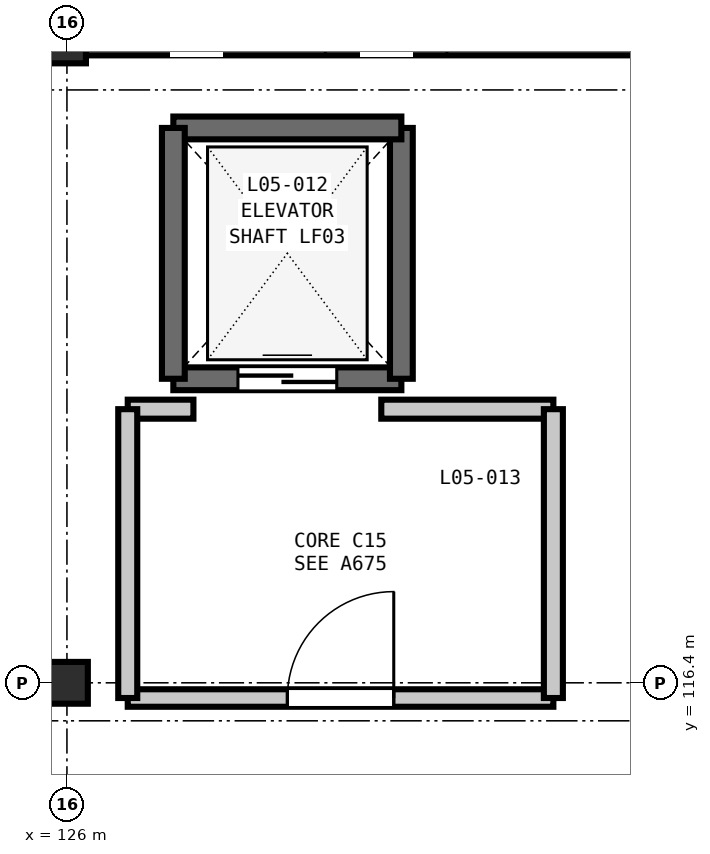
"""IFC4 building model, lengths in metres.
Left out: names, types, materials, properties, quantities, classifications, styles, units other than length and angle.
Written with IfcOpenShell. Run it as: python <this file> out.ifc"""

import sys

from ifc_helpers import new_model, si_unit, direction, frame, frame_2d, origin, origin_2d, place, context, subcontext, project, spatial, rectangle, extrude, element, fill, save


model = new_model("IFC4")
c1 = context("Model", 3, precision=1e-05, world=origin(), true_north=direction((0.0, 1.0)))
c2 = subcontext(c1, "Body", "Model", "MODEL_VIEW")
j1 = project(units=[si_unit("LENGTHUNIT", "METRE"), si_unit("PLANEANGLEUNIT", "RADIAN")], contexts=[c1])
p1 = place(None, origin())
s1 = spatial("IfcSite", under=j1, at=p1, CompositionType="ELEMENT")
p2 = place(p1, origin())
s2 = spatial("IfcBuilding", under=s1, at=p2, CompositionType="ELEMENT")
p3 = place(p2, frame((0.0, 0.0, 24.6)))
s3 = spatial("IfcBuildingStorey", under=s2, at=p3, CompositionType="ELEMENT", Elevation=24.6)
p4 = place(p3, frame((126.0, 116.4, 0.0), z_axis=(0.0, 0.0, 1.0), x_axis=(1.0, 0.0, 0.0)))
e1 = element("IfcColumn", 1, at=p4, inside=s3, PredefinedType="COLUMN", context=c2, shape_type="SweptSolid", body=[
    extrude(rectangle(XDim=0.55, YDim=0.55, at=origin_2d()), origin(), (0.0, 0.0, 1.0), 4.2),
])
p5 = place(p3, frame((126.0, 124.8, 0.0), z_axis=(0.0, 0.0, 1.0), x_axis=(1.0, 0.0, 0.0)))
e2 = element("IfcColumn", 2, at=p5, inside=s3, PredefinedType="COLUMN", context=c2, shape_type="SweptSolid", body=[
    extrude(rectangle(XDim=0.5, YDim=0.5, at=origin_2d()), origin(), (0.0, 0.0, 1.0), 4.2),
])
p6 = place(p3, frame((126.248, 124.8, 0.0), z_axis=(0.0, 0.0, 1.0), x_axis=(1.0, 0.0, 0.0)))
e3 = element("IfcWall", 3, at=p6, inside=s3, PredefinedType="SOLIDWALL", context=c2, shape_type="SweptSolid", body=[
    extrude(rectangle(XDim=7.904, YDim=0.29, at=frame_2d((3.952, 0.0))), origin(), (0.0, 0.0, 1.0), 3.48),
])
p7 = place(p6, frame((3.152, 0.0, 0.9)))
e4 = element("IfcOpeningElement", 4, at=p7, cuts=e3, PredefinedType="OPENING", context=c2, shape_type="SweptSolid", body=[
    extrude(rectangle(XDim=1.6, YDim=1.95, at=frame_2d((0.8, 0.975))), frame((0.0, 0.155, 0.0), z_axis=(0.0, -1.0, 0.0), x_axis=(1.0, 0.0, 0.0)), (0.0, 0.0, 1.0), 0.31),
])
p8 = place(p3, frame((127.4, 120.4, 0.0), z_axis=(0.0, 0.0, 1.0), x_axis=(1.0, 0.0, 0.0)))
e5 = element("IfcWall", 5, at=p8, inside=s3, PredefinedType="SHEAR", context=c2, shape_type="SweptSolid", body=[
    extrude(rectangle(XDim=3.0, YDim=0.3, at=frame_2d((1.5, 0.0))), origin(), (0.0, 0.0, 1.0), 4.2),
])
p9 = place(p8, frame((0.85, 0.0, 0.0)))
e6 = element("IfcOpeningElement", 6, at=p9, cuts=e5, PredefinedType="OPENING", context=c2, shape_type="SweptSolid", body=[
    extrude(rectangle(XDim=1.3, YDim=2.2, at=frame_2d((0.65, 1.1))), frame((0.0, 0.16, 0.0), z_axis=(0.0, -1.0, 0.0), x_axis=(1.0, 0.0, 0.0)), (0.0, 0.0, 1.0), 0.32),
])
p10 = place(p3, frame((130.4, 120.4, 0.0), z_axis=(0.0, 0.0, 1.0), x_axis=(0.0, 1.0, 0.0)))
e7 = element("IfcWall", 7, at=p10, inside=s3, PredefinedType="SHEAR", context=c2, shape_type="SweptSolid", body=[
    extrude(rectangle(XDim=3.3, YDim=0.3, at=frame_2d((1.65, 0.0))), origin(), (0.0, 0.0, 1.0), 4.2),
])
p11 = place(p3, frame((130.4, 123.7, 0.0), z_axis=(0.0, 0.0, 1.0), x_axis=(-1.0, 0.0, 0.0)))
e8 = element("IfcWall", 8, at=p11, inside=s3, PredefinedType="SHEAR", context=c2, shape_type="SweptSolid", body=[
    extrude(rectangle(XDim=3.0, YDim=0.3, at=frame_2d((1.5, 0.0))), origin(), (0.0, 0.0, 1.0), 4.2),
])
p12 = place(p3, frame((127.4, 123.7, 0.0), z_axis=(0.0, 0.0, 1.0), x_axis=(0.0, -1.0, 0.0)))
e9 = element("IfcWall", 9, at=p12, inside=s3, PredefinedType="SHEAR", context=c2, shape_type="SweptSolid", body=[
    extrude(rectangle(XDim=3.3, YDim=0.3, at=frame_2d((1.65, 0.0))), origin(), (0.0, 0.0, 1.0), 4.2),
])
p13 = place(p3, frame((126.8, 116.2, 0.0), z_axis=(0.0, 0.0, 1.0), x_axis=(1.0, 0.0, 0.0)))
e10 = element("IfcWall", 10, at=p13, inside=s3, PredefinedType="PARTITIONING", context=c2, shape_type="SweptSolid", body=[
    extrude(rectangle(XDim=5.6, YDim=0.23, at=frame_2d((2.8, 0.0))), origin(), (0.0, 0.0, 1.0), 3.585),
])
p14 = place(p13, frame((2.1, 0.0, 0.0)))
e11 = element("IfcOpeningElement", 11, at=p14, cuts=e10, PredefinedType="OPENING", context=c2, shape_type="SweptSolid", body=[
    extrude(rectangle(XDim=1.4, YDim=2.2, at=frame_2d((0.7, 1.1))), frame((0.0, 0.125, 0.0), z_axis=(0.0, -1.0, 0.0), x_axis=(1.0, 0.0, 0.0)), (0.0, 0.0, 1.0), 0.25),
])
p15 = place(p3, frame((130.136, 120.0, 0.0), z_axis=(0.0, 0.0, 1.0), x_axis=(1.0, 0.0, 0.0)))
e12 = element("IfcWall", 12, at=p15, inside=s3, PredefinedType="PARTITIONING", context=c2, shape_type="SweptSolid", body=[
    extrude(rectangle(XDim=2.264, YDim=0.25, at=frame_2d((1.132, 0.0))), origin(), (0.0, 0.0, 1.0), 3.92),
])
p16 = place(p3, frame((126.8, 120.0, 0.0), z_axis=(0.0, 0.0, 1.0), x_axis=(1.0, 0.0, 0.0)))
e13 = element("IfcWall", 13, at=p16, inside=s3, PredefinedType="PARTITIONING", context=c2, shape_type="SweptSolid", body=[
    extrude(rectangle(XDim=0.864, YDim=0.25, at=frame_2d((0.432, 0.0))), origin(), (0.0, 0.0, 1.0), 3.92),
])
for number, where, z_axis, x_axis in (
    (14, (126.8, 116.2, 0.0), (0.0, 0.0, 1.0), (0.0, 1.0, 0.0)),
    (15, (132.4, 116.2, 0.0), (0.0, 0.0, 1.0), (0.0, 1.0, 0.0)),
):
    element("IfcWall", number, at=place(p3, frame(where, z_axis=z_axis, x_axis=x_axis)), inside=s3, PredefinedType="PARTITIONING", context=c2, shape_type="SweptSolid", body=[
        extrude(rectangle(XDim=3.8, YDim=0.25, at=frame_2d((1.9, 0.0))), origin(), (0.0, 0.0, 1.0), 3.92),
    ])
p17 = place(p9, origin())
e16 = element("IfcDoor", 16, at=p17, inside=s3, OperationType="DOUBLE_DOOR_SLIDING", PredefinedType="DOOR", context=c2, shape_type="SweptSolid", body=[
    extrude(rectangle(XDim=1.3, YDim=2.2, at=frame_2d((0.65, 1.1))), frame((0.0, 0.025, 0.0), z_axis=(0.0, -1.0, 0.0), x_axis=(1.0, 0.0, 0.0)), (0.0, 0.0, 1.0), 0.05),
])
fill(e6, e16)
p18 = place(p14, origin())
e17 = element("IfcDoor", 17, at=p18, inside=s3, OperationType="SINGLE_SWING_RIGHT", PredefinedType="DOOR", context=c2, shape_type="SweptSolid", body=[
    extrude(rectangle(XDim=1.4, YDim=2.2, at=frame_2d((0.7, 1.1))), frame((0.0, 0.025, 0.0), z_axis=(0.0, -1.0, 0.0), x_axis=(1.0, 0.0, 0.0)), (0.0, 0.0, 1.0), 0.05),
])
fill(e11, e17)
save(model, sys.argv[1])
